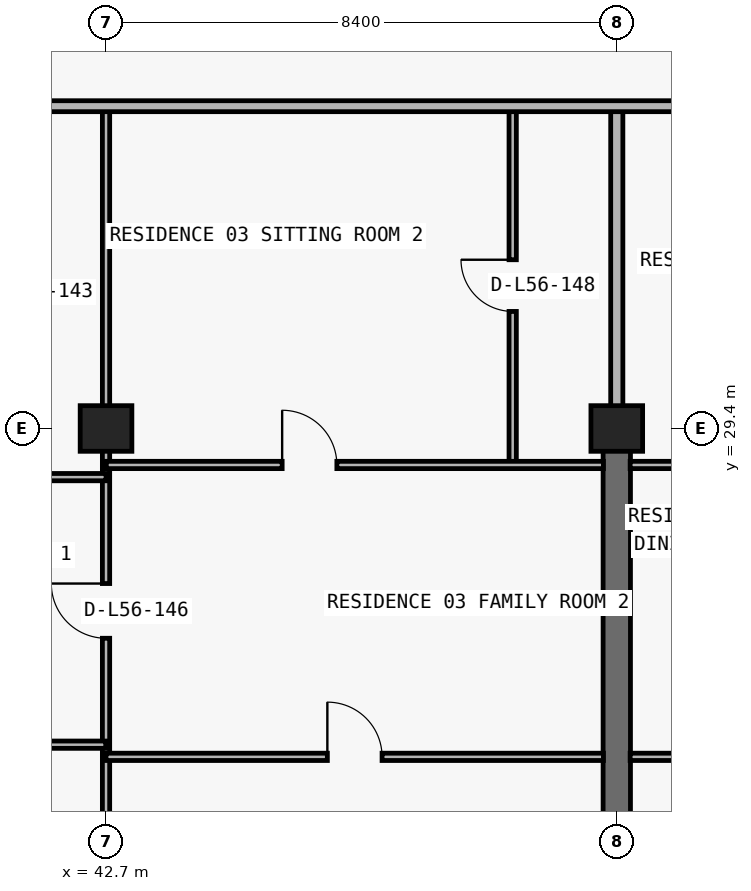
"""IFC4 building model, lengths in metres.
Left out: names, types, materials, properties, quantities, classifications, styles, units other than length and angle.
Written with IfcOpenShell. Run it as: python <this file> out.ifc"""

import sys

from ifc_helpers import new_model, si_unit, direction, frame, frame_2d, origin, origin_2d, place, context, subcontext, project, spatial, rectangle, extrude, element, fill, save


model = new_model("IFC4")
c1 = context("Model", 3, precision=1e-05, world=origin(), true_north=direction((0.0, 1.0)))
c2 = subcontext(c1, "Body", "Model", "MODEL_VIEW")
j1 = project(units=[si_unit("LENGTHUNIT", "METRE"), si_unit("PLANEANGLEUNIT", "RADIAN")], contexts=[c1])
p1 = place(None, origin())
s1 = spatial("IfcSite", under=j1, at=p1, CompositionType="ELEMENT")
p2 = place(p1, origin())
s2 = spatial("IfcBuilding", under=s1, at=p2, CompositionType="ELEMENT")
p3 = place(p2, frame((0.0, 0.0, 201.6)))
s3 = spatial("IfcBuildingStorey", under=s2, at=p3, CompositionType="ELEMENT", Elevation=201.6)
for number, where, z_axis, x_axis in (
    (1, (42.7, 29.4, 0.0), (0.0, 0.0, 1.0), (1.0, 0.0, 0.0)),
    (2, (51.1, 29.4, 0.0), (0.0, 0.0, 1.0), (1.0, 0.0, 0.0)),
):
    element("IfcColumn", number, at=place(p3, frame(where, z_axis=z_axis, x_axis=x_axis)), inside=s3, PredefinedType="COLUMN", context=c2, shape_type="SweptSolid", body=[
        extrude(rectangle(XDim=0.85, YDim=0.75, at=origin_2d()), origin(), (0.0, 0.0, 1.0), 3.05),
    ])
p4 = place(p3, frame((51.1, 20.8, 0.0), z_axis=(0.0, 0.0, 1.0), x_axis=(0.0, 1.0, 0.0)))
e3 = element("IfcWall", 3, at=p4, inside=s3, PredefinedType="SHEAR", context=c2, shape_type="SweptSolid", body=[
    extrude(rectangle(XDim=8.6, YDim=0.45, at=frame_2d((4.3, 0.0))), origin(), (0.0, 0.0, 1.0), 3.05),
])
p5 = place(p3, frame((42.7, 11.24, 0.0), z_axis=(0.0, 0.0, 1.0), x_axis=(0.0, 1.0, 0.0)))
e4 = element("IfcWall", 4, at=p5, inside=s3, PredefinedType="PARTITIONING", context=c2, shape_type="SweptSolid", body=[
    extrude(rectangle(XDim=23.46, YDim=0.12, at=frame_2d((11.73, 0.0))), origin(), (0.0, 0.0, 1.0), 2.263),
])
p6 = place(p5, frame((14.71, 0.0, 0.0)))
e5 = element("IfcOpeningElement", 5, at=p6, cuts=e4, PredefinedType="OPENING", context=c2, shape_type="SweptSolid", body=[
    extrude(rectangle(XDim=0.9, YDim=2.15, at=frame_2d((0.45, 1.075))), frame((0.0, 0.07, 0.0), z_axis=(0.0, -1.0, 0.0), x_axis=(1.0, 0.0, 0.0)), (0.0, 0.0, 1.0), 0.14),
])
p7 = place(p3, frame((49.388, 28.8, 0.0), z_axis=(0.0, 0.0, 1.0), x_axis=(0.0, 1.0, 0.0)))
e6 = element("IfcWall", 6, at=p7, inside=s3, PredefinedType="PARTITIONING", context=c2, shape_type="SweptSolid", body=[
    extrude(rectangle(XDim=5.9, YDim=0.12, at=frame_2d((2.95, 0.0))), origin(), (0.0, 0.0, 1.0), 3.05),
])
p8 = place(p7, frame((2.525, 0.0, 0.0)))
e7 = element("IfcOpeningElement", 7, at=p8, cuts=e6, PredefinedType="OPENING", context=c2, shape_type="SweptSolid", body=[
    extrude(rectangle(XDim=0.85, YDim=2.1, at=frame_2d((0.425, 1.05))), frame((0.0, 0.07, 0.0), z_axis=(0.0, -1.0, 0.0), x_axis=(1.0, 0.0, 0.0)), (0.0, 0.0, 1.0), 0.14),
])
p9 = place(p3, frame((51.1, 29.405, 0.0), z_axis=(0.0, 0.0, 1.0), x_axis=(0.0, 1.0, 0.0)))
e8 = element("IfcWall", 8, at=p9, inside=s3, PredefinedType="PARTITIONING", context=c2, shape_type="SweptSolid", body=[
    extrude(rectangle(XDim=5.295, YDim=0.2, at=frame_2d((2.647, 0.0))), origin(), (0.0, 0.0, 1.0), 2.335),
])
p10 = place(p3, frame((42.7, 24.0, 0.0), z_axis=(0.0, 0.0, 1.0), x_axis=(1.0, 0.0, 0.0)))
e9 = element("IfcWall", 9, at=p10, inside=s3, PredefinedType="PARTITIONING", context=c2, shape_type="SweptSolid", body=[
    extrude(rectangle(XDim=8.18, YDim=0.12, at=frame_2d((4.09, 0.0))), origin(), (0.0, 0.0, 1.0), 3.05),
])
p11 = place(p10, frame((3.64, 0.0, 0.0)))
e10 = element("IfcOpeningElement", 10, at=p11, cuts=e9, PredefinedType="OPENING", context=c2, shape_type="SweptSolid", body=[
    extrude(rectangle(XDim=0.9, YDim=2.15, at=frame_2d((0.45, 1.075))), frame((0.0, 0.07, 0.0), z_axis=(0.0, -1.0, 0.0), x_axis=(1.0, 0.0, 0.0)), (0.0, 0.0, 1.0), 0.14),
])
p12 = place(p3, frame((51.32, 24.0, 0.0), z_axis=(0.0, 0.0, 1.0), x_axis=(1.0, 0.0, 0.0)))
e11 = element("IfcWall", 11, at=p12, inside=s3, PredefinedType="PARTITIONING", context=c2, shape_type="SweptSolid", body=[
    extrude(rectangle(XDim=8.18, YDim=0.12, at=frame_2d((4.09, 0.0))), origin(), (0.0, 0.0, 1.0), 3.05),
])
p13 = place(p12, frame((1.204, 0.0, 0.0)))
e12 = element("IfcOpeningElement", 12, at=p13, cuts=e11, PredefinedType="OPENING", context=c2, shape_type="SweptSolid", body=[
    extrude(rectangle(XDim=0.9, YDim=2.15, at=frame_2d((0.45, 1.075))), frame((0.0, 0.07, 0.0), z_axis=(0.0, -1.0, 0.0), x_axis=(1.0, 0.0, 0.0)), (0.0, 0.0, 1.0), 0.14),
])
p14 = place(p3, frame((41.2, 24.2, 0.0), z_axis=(0.0, 0.0, 1.0), x_axis=(1.0, 0.0, 0.0)))
e13 = element("IfcWall", 13, at=p14, inside=s3, PredefinedType="PARTITIONING", context=c2, shape_type="SweptSolid", body=[
    extrude(rectangle(XDim=1.495, YDim=0.12, at=frame_2d((0.748, 0.0))), origin(), (0.0, 0.0, 1.0), 3.05),
])
p15 = place(p3, frame((41.2, 28.6, 0.0), z_axis=(0.0, 0.0, 1.0), x_axis=(1.0, 0.0, 0.0)))
e14 = element("IfcWall", 14, at=p15, inside=s3, PredefinedType="PARTITIONING", context=c2, shape_type="SweptSolid", body=[
    extrude(rectangle(XDim=1.5, YDim=0.12, at=frame_2d((0.75, 0.0))), origin(), (0.0, 0.0, 1.0), 3.05),
])
p16 = place(p3, frame((42.705, 28.8, 0.0), z_axis=(0.0, 0.0, 1.0), x_axis=(1.0, 0.0, 0.0)))
e15 = element("IfcWall", 15, at=p16, inside=s3, PredefinedType="PARTITIONING", context=c2, shape_type="SweptSolid", body=[
    extrude(rectangle(XDim=8.175, YDim=0.12, at=frame_2d((4.087, 0.0))), origin(), (0.0, 0.0, 1.0), 3.05),
])
p17 = place(p16, frame((2.892, 0.0, 0.0)))
e16 = element("IfcOpeningElement", 16, at=p17, cuts=e15, PredefinedType="OPENING", context=c2, shape_type="SweptSolid", body=[
    extrude(rectangle(XDim=0.9, YDim=2.15, at=frame_2d((0.45, 1.075))), frame((0.0, 0.07, 0.0), z_axis=(0.0, -1.0, 0.0), x_axis=(1.0, 0.0, 0.0)), (0.0, 0.0, 1.0), 0.14),
])
p18 = place(p3, frame((51.32, 28.8, 0.0), z_axis=(0.0, 0.0, 1.0), x_axis=(1.0, 0.0, 0.0)))
e17 = element("IfcWall", 17, at=p18, inside=s3, PredefinedType="PARTITIONING", context=c2, shape_type="SweptSolid", body=[
    extrude(rectangle(XDim=8.175, YDim=0.12, at=frame_2d((4.087, 0.0))), origin(), (0.0, 0.0, 1.0), 3.05),
])
p19 = place(p18, frame((1.204, 0.0, 0.0)))
e18 = element("IfcOpeningElement", 18, at=p19, cuts=e17, PredefinedType="OPENING", context=c2, shape_type="SweptSolid", body=[
    extrude(rectangle(XDim=0.9, YDim=2.15, at=frame_2d((0.45, 1.075))), frame((0.0, 0.07, 0.0), z_axis=(0.0, -1.0, 0.0), x_axis=(1.0, 0.0, 0.0)), (0.0, 0.0, 1.0), 0.14),
])
p20 = place(p3, frame((41.2, 34.7, 0.0), z_axis=(0.0, 0.0, 1.0), x_axis=(1.0, 0.0, 0.0)))
e19 = element("IfcWall", 19, at=p20, inside=s3, PredefinedType="PARTITIONING", context=c2, shape_type="SweptSolid", body=[
    extrude(rectangle(XDim=26.5, YDim=0.18, at=frame_2d((13.25, 0.0))), origin(), (0.0, 0.0, 1.0), 3.05),
])
p21 = place(p20, frame((12.77, 0.0, 0.0)))
e20 = element("IfcOpeningElement", 20, at=p21, cuts=e19, PredefinedType="OPENING", context=c2, shape_type="SweptSolid", body=[
    extrude(rectangle(XDim=1.0, YDim=2.2, at=frame_2d((0.5, 1.1))), frame((0.0, 0.1, 0.0), z_axis=(0.0, -1.0, 0.0), x_axis=(1.0, 0.0, 0.0)), (0.0, 0.0, 1.0), 0.2),
])
p22 = place(p6, origin())
e21 = element("IfcDoor", 21, at=p22, inside=s3, OperationType="SINGLE_SWING_RIGHT", PredefinedType="DOOR", context=c2, shape_type="SweptSolid", body=[
    extrude(rectangle(XDim=0.9, YDim=2.15, at=frame_2d((0.45, 1.075))), frame((0.0, 0.025, 0.0), z_axis=(0.0, -1.0, 0.0), x_axis=(1.0, 0.0, 0.0)), (0.0, 0.0, 1.0), 0.05),
])
fill(e5, e21)
p23 = place(p17, origin())
e22 = element("IfcDoor", 22, at=p23, inside=s3, OperationType="SINGLE_SWING_LEFT", PredefinedType="DOOR", context=c2, shape_type="SweptSolid", body=[
    extrude(rectangle(XDim=0.9, YDim=2.15, at=frame_2d((0.45, 1.075))), frame((0.0, 0.025, 0.0), z_axis=(0.0, -1.0, 0.0), x_axis=(1.0, 0.0, 0.0)), (0.0, 0.0, 1.0), 0.05),
])
fill(e16, e22)
p24 = place(p8, origin())
e23 = element("IfcDoor", 23, at=p24, inside=s3, OperationType="SINGLE_SWING_RIGHT", PredefinedType="DOOR", context=c2, shape_type="SweptSolid", body=[
    extrude(rectangle(XDim=0.85, YDim=2.1, at=frame_2d((0.425, 1.05))), frame((0.0, 0.025, 0.0), z_axis=(0.0, -1.0, 0.0), x_axis=(1.0, 0.0, 0.0)), (0.0, 0.0, 1.0), 0.05),
])
fill(e7, e23)
p25 = place(p11, origin())
e24 = element("IfcDoor", 24, at=p25, inside=s3, OperationType="SINGLE_SWING_LEFT", PredefinedType="DOOR", context=c2, shape_type="SweptSolid", body=[
    extrude(rectangle(XDim=0.9, YDim=2.15, at=frame_2d((0.45, 1.075))), frame((0.0, 0.025, 0.0), z_axis=(0.0, -1.0, 0.0), x_axis=(1.0, 0.0, 0.0)), (0.0, 0.0, 1.0), 0.05),
])
fill(e10, e24)
save(model, sys.argv[1])
